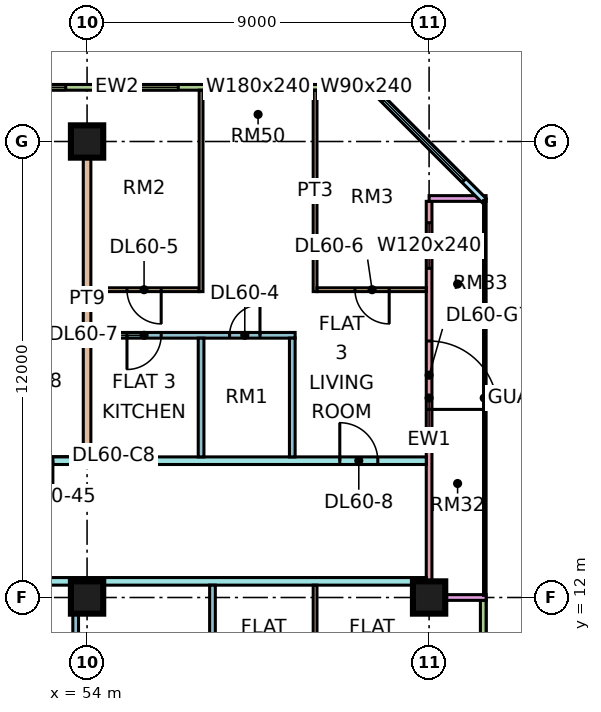
"""IFC4 building model, lengths in metres.
Left out: names, types, materials, properties, quantities, classifications, styles, units other than length and angle.
Written with IfcOpenShell. Run it as: python <this file> out.ifc"""

import sys

from ifc_helpers import new_model, si_unit, direction, frame, frame_2d, origin, origin_2d, place, context, subcontext, project, spatial, rectangle, extrude, element, fill, save


model = new_model("IFC4")
c1 = context("Model", 3, precision=1e-05, world=origin(), true_north=direction((0.0, 1.0)))
c2 = subcontext(c1, "Body", "Model", "MODEL_VIEW")
j1 = project(units=[si_unit("LENGTHUNIT", "METRE"), si_unit("PLANEANGLEUNIT", "RADIAN")], contexts=[c1])
p1 = place(None, origin())
s1 = spatial("IfcSite", under=j1, at=p1, CompositionType="ELEMENT")
p2 = place(p1, origin())
s2 = spatial("IfcBuilding", under=s1, at=p2, CompositionType="ELEMENT")
p3 = place(p2, frame((0.0, 0.0, 252.9)))
s3 = spatial("IfcBuildingStorey", under=s2, at=p3, CompositionType="ELEMENT", Elevation=252.9)
for number, where, z_axis, x_axis in (
    (1, (54.0, 12.0, 0.0), (0.0, 0.0, 1.0), (1.0, 0.0, 0.0)),
    (2, (54.0, 24.0, 0.0), (0.0, 0.0, 1.0), (1.0, 0.0, 0.0)),
    (3, (63.0, 12.0, 0.0), (0.0, 0.0, 1.0), (1.0, 0.0, 0.0)),
):
    element("IfcColumn", number, at=place(p3, frame(where, z_axis=z_axis, x_axis=x_axis)), inside=s3, PredefinedType="COLUMN", context=c2, shape_type="SweptSolid", body=[
        extrude(rectangle(XDim=0.85, YDim=0.85, at=origin_2d()), origin(), (0.0, 0.0, 1.0), 3.75),
    ])
p4 = place(p3, frame((61.5, 25.425, 0.0), z_axis=(0.0, 0.0, 1.0), x_axis=(-1.0, 0.0, 0.0)))
e4 = element("IfcWall", 4, at=p4, inside=s3, PredefinedType="SOLIDWALL", context=c2, shape_type="SweptSolid", body=[
    extrude(rectangle(XDim=13.425, YDim=0.15, at=frame_2d((6.712, 0.0))), origin(), (0.0, 0.0, 1.0), 3.3),
])
p5 = place(p4, frame((0.3, 0.0, 0.45)))
e5 = element("IfcOpeningElement", 5, at=p5, cuts=e4, PredefinedType="OPENING", context=c2, shape_type="SweptSolid", body=[
    extrude(rectangle(XDim=0.9, YDim=2.4, at=frame_2d((0.45, 1.2))), frame((0.0, 0.085, 0.0), z_axis=(0.0, -1.0, 0.0), x_axis=(1.0, 0.0, 0.0)), (0.0, 0.0, 1.0), 0.17),
])
p6 = place(p4, frame((2.1, 0.0, 0.45)))
e6 = element("IfcOpeningElement", 6, at=p6, cuts=e4, PredefinedType="OPENING", context=c2, shape_type="SweptSolid", body=[
    extrude(rectangle(XDim=1.8, YDim=2.4, at=frame_2d((0.9, 1.2))), frame((0.0, 0.085, 0.0), z_axis=(0.0, -1.0, 0.0), x_axis=(1.0, 0.0, 0.0)), (0.0, 0.0, 1.0), 0.17),
])
p7 = place(p4, frame((5.1, 0.0, 0.45)))
e7 = element("IfcOpeningElement", 7, at=p7, cuts=e4, PredefinedType="OPENING", context=c2, shape_type="SweptSolid", body=[
    extrude(rectangle(XDim=1.8, YDim=2.4, at=frame_2d((0.9, 1.2))), frame((0.0, 0.085, 0.0), z_axis=(0.0, -1.0, 0.0), x_axis=(1.0, 0.0, 0.0)), (0.0, 0.0, 1.0), 0.17),
])
p8 = place(p4, frame((8.062, 0.0, 0.45)))
e8 = element("IfcOpeningElement", 8, at=p8, cuts=e4, PredefinedType="OPENING", context=c2, shape_type="SweptSolid", body=[
    extrude(rectangle(XDim=4.8, YDim=2.4, at=frame_2d((2.4, 1.2))), frame((0.0, 0.085, 0.0), z_axis=(0.0, -1.0, 0.0), x_axis=(1.0, 0.0, 0.0)), (0.0, 0.0, 1.0), 0.17),
])
p9 = place(p3, frame((64.425, 1.5, 0.0), z_axis=(0.0, 0.0, 1.0), x_axis=(0.0, 1.0, 0.0)))
e9 = element("IfcWall", 9, at=p9, inside=s3, PredefinedType="SOLIDWALL", context=c2, shape_type="SweptSolid", body=[
    extrude(rectangle(XDim=10.425, YDim=0.15, at=frame_2d((5.212, 0.0))), origin(), (0.0, 0.0, 1.0), 3.3),
])
p10 = place(p9, frame((0.663, 0.0, 0.45)))
e10 = element("IfcOpeningElement", 10, at=p10, cuts=e9, PredefinedType="OPENING", context=c2, shape_type="SweptSolid", body=[
    extrude(rectangle(XDim=4.8, YDim=2.4, at=frame_2d((2.4, 1.2))), frame((0.0, 0.085, 0.0), z_axis=(0.0, -1.0, 0.0), x_axis=(1.0, 0.0, 0.0)), (0.0, 0.0, 1.0), 0.17),
])
p11 = place(p3, frame((63.0, 12.075, 0.0), z_axis=(0.0, 0.0, 1.0), x_axis=(0.0, 1.0, 0.0)))
e11 = element("IfcWall", 11, at=p11, inside=s3, PredefinedType="SOLIDWALL", context=c2, shape_type="SweptSolid", body=[
    extrude(rectangle(XDim=10.35, YDim=0.15, at=frame_2d((5.175, 0.0))), origin(), (0.0, 0.0, 1.0), 3.3),
])
p12 = place(p11, frame((4.875, 0.0, 0.0)))
e12 = element("IfcOpeningElement", 12, at=p12, cuts=e11, PredefinedType="OPENING", context=c2, shape_type="SweptSolid", body=[
    extrude(rectangle(XDim=1.8, YDim=2.4, at=frame_2d((0.9, 1.2))), frame((0.0, 0.085, 0.0), z_axis=(0.0, -1.0, 0.0), x_axis=(1.0, 0.0, 0.0)), (0.0, 0.0, 1.0), 0.17),
])
p13 = place(p11, frame((8.587, 0.0, 0.45)))
e13 = element("IfcOpeningElement", 13, at=p13, cuts=e11, PredefinedType="OPENING", context=c2, shape_type="SweptSolid", body=[
    extrude(rectangle(XDim=1.2, YDim=2.4, at=frame_2d((0.6, 1.2))), frame((0.0, 0.085, 0.0), z_axis=(0.0, -1.0, 0.0), x_axis=(1.0, 0.0, 0.0)), (0.0, 0.0, 1.0), 0.17),
])
for number, where, z_axis, x_axis in (
    (14, (64.5, 12.0, 0.0), (0.0, 0.0, 1.0), (-1.0, 0.0, 0.0)),
    (15, (64.5, 22.5, 0.0), (0.0, 0.0, 1.0), (-1.0, 0.0, 0.0)),
):
    element("IfcWall", number, at=place(p3, frame(where, z_axis=z_axis, x_axis=x_axis)), inside=s3, PredefinedType="SOLIDWALL", context=c2, shape_type="SweptSolid", body=[
        extrude(rectangle(XDim=1.5, YDim=0.15, at=frame_2d((0.75, 0.0))), origin(), (0.0, 0.0, 1.0), 3.3),
    ])
p14 = place(p3, frame((64.447, 22.447, 0.0), z_axis=(0.0, 0.0, 1.0), x_axis=(-0.707106781187, 0.707106781187, 0.0)))
e16 = element("IfcWall", 16, at=p14, inside=s3, PredefinedType="SOLIDWALL", context=c2, shape_type="SweptSolid", body=[
    extrude(rectangle(XDim=4.243, YDim=0.15, at=frame_2d((2.121, 0.0))), origin(), (0.0, 0.0, 1.0), 3.3),
])
p15 = place(p14, frame((0.744, 0.0, 0.45)))
e17 = element("IfcOpeningElement", 17, at=p15, cuts=e16, PredefinedType="OPENING", context=c2, shape_type="SweptSolid", body=[
    extrude(rectangle(XDim=3.0, YDim=2.4, at=frame_2d((1.5, 1.2))), frame((0.0, 0.085, 0.0), z_axis=(0.0, -1.0, 0.0), x_axis=(1.0, 0.0, 0.0)), (0.0, 0.0, 1.0), 0.17),
])
p16 = place(p3, frame((40.65, 12.425, 0.0), z_axis=(0.0, 0.0, 1.0), x_axis=(1.0, 0.0, 0.0)))
e18 = element("IfcWall", 18, at=p16, inside=s3, PredefinedType="PARTITIONING", context=c2, shape_type="SweptSolid", body=[
    extrude(rectangle(XDim=22.276, YDim=0.2, at=frame_2d((11.138, 0.0))), origin(), (0.0, 0.0, 1.0), 3.3),
])
p17 = place(p16, frame((8.7, 0.0, 0.0)))
e19 = element("IfcOpeningElement", 19, at=p17, cuts=e18, PredefinedType="OPENING", context=c2, shape_type="SweptSolid", body=[
    extrude(rectangle(XDim=1.0, YDim=2.1, at=frame_2d((0.5, 1.05))), frame((0.0, 0.11, 0.0), z_axis=(0.0, -1.0, 0.0), x_axis=(1.0, 0.0, 0.0)), (0.0, 0.0, 1.0), 0.22),
])
p18 = place(p16, frame((1.05, 0.0, 0.0)))
e20 = element("IfcOpeningElement", 20, at=p18, cuts=e18, PredefinedType="OPENING", context=c2, shape_type="SweptSolid", body=[
    extrude(rectangle(XDim=1.0, YDim=2.1, at=frame_2d((0.5, 1.05))), frame((0.0, 0.11, 0.0), z_axis=(0.0, -1.0, 0.0), x_axis=(1.0, 0.0, 0.0)), (0.0, 0.0, 1.0), 0.22),
])
p19 = place(p3, frame((51.225, 15.6, 0.0), z_axis=(0.0, 0.0, 1.0), x_axis=(1.0, 0.0, 0.0)))
e21 = element("IfcWall", 21, at=p19, inside=s3, PredefinedType="PARTITIONING", context=c2, shape_type="SweptSolid", body=[
    extrude(rectangle(XDim=11.701, YDim=0.2, at=frame_2d((5.851, 0.0))), origin(), (0.0, 0.0, 1.0), 3.3),
])
p20 = place(p19, frame((9.425, 0.0, 0.0)))
e22 = element("IfcOpeningElement", 22, at=p20, cuts=e21, PredefinedType="OPENING", context=c2, shape_type="SweptSolid", body=[
    extrude(rectangle(XDim=1.0, YDim=2.1, at=frame_2d((0.5, 1.05))), frame((0.0, 0.11, 0.0), z_axis=(0.0, -1.0, 0.0), x_axis=(1.0, 0.0, 0.0)), (0.0, 0.0, 1.0), 0.22),
])
p21 = place(p19, frame((0.875, 0.0, 0.0)))
e23 = element("IfcOpeningElement", 23, at=p21, cuts=e21, PredefinedType="OPENING", context=c2, shape_type="SweptSolid", body=[
    extrude(rectangle(XDim=1.0, YDim=2.1, at=frame_2d((0.5, 1.05))), frame((0.0, 0.11, 0.0), z_axis=(0.0, -1.0, 0.0), x_axis=(1.0, 0.0, 0.0)), (0.0, 0.0, 1.0), 0.22),
])
p22 = place(p3, frame((53.7, 7.7, 0.0), z_axis=(0.0, 0.0, 1.0), x_axis=(0.0, 1.0, 0.0)))
e24 = element("IfcWall", 24, at=p22, inside=s3, PredefinedType="PARTITIONING", context=c2, shape_type="SweptSolid", body=[
    extrude(rectangle(XDim=4.625, YDim=0.15, at=frame_2d((2.312, 0.0))), origin(), (0.0, 0.0, 1.0), 3.3),
])
p23 = place(p3, frame((54.0, 15.7, 0.0), z_axis=(0.0, 0.0, 1.0), x_axis=(0.0, 1.0, 0.0)))
e25 = element("IfcWall", 25, at=p23, inside=s3, PredefinedType="PARTITIONING", context=c2, shape_type="SweptSolid", body=[
    extrude(rectangle(XDim=8.3, YDim=0.2, at=frame_2d((4.15, 0.0))), origin(), (0.0, 0.0, 1.0), 3.3),
])
p24 = place(p3, frame((54.1, 18.9, 0.0), z_axis=(0.0, 0.0, 1.0), x_axis=(1.0, 0.0, 0.0)))
e26 = element("IfcWall", 26, at=p24, inside=s3, PredefinedType="PARTITIONING", context=c2, shape_type="SweptSolid", body=[
    extrude(rectangle(XDim=5.375, YDim=0.15, at=frame_2d((2.688, 0.0))), origin(), (0.0, 0.0, 1.0), 3.3),
])
p25 = place(p24, frame((3.65, 0.0, 0.0)))
e27 = element("IfcOpeningElement", 27, at=p25, cuts=e26, PredefinedType="OPENING", context=c2, shape_type="SweptSolid", body=[
    extrude(rectangle(XDim=0.8, YDim=2.1, at=frame_2d((0.4, 1.05))), frame((0.0, 0.085, 0.0), z_axis=(0.0, -1.0, 0.0), x_axis=(1.0, 0.0, 0.0)), (0.0, 0.0, 1.0), 0.17),
])
p26 = place(p24, frame((0.95, 0.0, 0.0)))
e28 = element("IfcOpeningElement", 28, at=p26, cuts=e26, PredefinedType="OPENING", context=c2, shape_type="SweptSolid", body=[
    extrude(rectangle(XDim=0.9, YDim=2.1, at=frame_2d((0.45, 1.05))), frame((0.0, 0.085, 0.0), z_axis=(0.0, -1.0, 0.0), x_axis=(1.0, 0.0, 0.0)), (0.0, 0.0, 1.0), 0.17),
])
p27 = place(p3, frame((54.1, 20.1, 0.0), z_axis=(0.0, 0.0, 1.0), x_axis=(1.0, 0.0, 0.0)))
e29 = element("IfcWall", 29, at=p27, inside=s3, PredefinedType="PARTITIONING", context=c2, shape_type="SweptSolid", body=[
    extrude(rectangle(XDim=2.85, YDim=0.1, at=frame_2d((1.425, 0.0))), origin(), (0.0, 0.0, 1.0), 3.3),
])
p28 = place(p27, frame((0.95, 0.0, 0.0)))
e30 = element("IfcOpeningElement", 30, at=p28, cuts=e29, PredefinedType="OPENING", context=c2, shape_type="SweptSolid", body=[
    extrude(rectangle(XDim=0.9, YDim=2.1, at=frame_2d((0.45, 1.05))), frame((0.0, 0.06, 0.0), z_axis=(0.0, -1.0, 0.0), x_axis=(1.0, 0.0, 0.0)), (0.0, 0.0, 1.0), 0.12),
])
p29 = place(p3, frame((57.0, 15.7, 0.0), z_axis=(0.0, 0.0, 1.0), x_axis=(0.0, 1.0, 0.0)))
e31 = element("IfcWall", 31, at=p29, inside=s3, PredefinedType="PARTITIONING", context=c2, shape_type="SweptSolid", body=[
    extrude(rectangle(XDim=3.125, YDim=0.15, at=frame_2d((1.562, 0.0))), origin(), (0.0, 0.0, 1.0), 3.3),
])
p30 = place(p3, frame((57.0, 20.05, 0.0), z_axis=(0.0, 0.0, 1.0), x_axis=(0.0, 1.0, 0.0)))
e32 = element("IfcWall", 32, at=p30, inside=s3, PredefinedType="PARTITIONING", context=c2, shape_type="SweptSolid", body=[
    extrude(rectangle(XDim=5.3, YDim=0.1, at=frame_2d((2.65, 0.0))), origin(), (0.0, 0.0, 1.0), 3.3),
])
p31 = place(p3, frame((57.3, 7.7, 0.0), z_axis=(0.0, 0.0, 1.0), x_axis=(0.0, 1.0, 0.0)))
e33 = element("IfcWall", 33, at=p31, inside=s3, PredefinedType="PARTITIONING", context=c2, shape_type="SweptSolid", body=[
    extrude(rectangle(XDim=4.625, YDim=0.15, at=frame_2d((2.312, 0.0))), origin(), (0.0, 0.0, 1.0), 3.3),
])
p32 = place(p3, frame((59.4, 15.7, 0.0), z_axis=(0.0, 0.0, 1.0), x_axis=(0.0, 1.0, 0.0)))
e34 = element("IfcWall", 34, at=p32, inside=s3, PredefinedType="PARTITIONING", context=c2, shape_type="SweptSolid", body=[
    extrude(rectangle(XDim=3.125, YDim=0.15, at=frame_2d((1.562, 0.0))), origin(), (0.0, 0.0, 1.0), 3.3),
])
p33 = place(p3, frame((60.0, 7.7, 0.0), z_axis=(0.0, 0.0, 1.0), x_axis=(0.0, 1.0, 0.0)))
e35 = element("IfcWall", 35, at=p33, inside=s3, PredefinedType="PARTITIONING", context=c2, shape_type="SweptSolid", body=[
    extrude(rectangle(XDim=4.625, YDim=0.1, at=frame_2d((2.312, 0.0))), origin(), (0.0, 0.0, 1.0), 3.3),
])
p34 = place(p3, frame((60.0, 20.05, 0.0), z_axis=(0.0, 0.0, 1.0), x_axis=(0.0, 1.0, 0.0)))
e36 = element("IfcWall", 36, at=p34, inside=s3, PredefinedType="PARTITIONING", context=c2, shape_type="SweptSolid", body=[
    extrude(rectangle(XDim=5.3, YDim=0.1, at=frame_2d((2.65, 0.0))), origin(), (0.0, 0.0, 1.0), 3.3),
])
p35 = place(p3, frame((60.05, 20.1, 0.0), z_axis=(0.0, 0.0, 1.0), x_axis=(1.0, 0.0, 0.0)))
e37 = element("IfcWall", 37, at=p35, inside=s3, PredefinedType="PARTITIONING", context=c2, shape_type="SweptSolid", body=[
    extrude(rectangle(XDim=2.876, YDim=0.1, at=frame_2d((1.438, 0.0))), origin(), (0.0, 0.0, 1.0), 3.3),
])
p36 = place(p35, frame((1.0, 0.0, 0.0)))
e38 = element("IfcOpeningElement", 38, at=p36, cuts=e37, PredefinedType="OPENING", context=c2, shape_type="SweptSolid", body=[
    extrude(rectangle(XDim=0.9, YDim=2.1, at=frame_2d((0.45, 1.05))), frame((0.0, 0.06, 0.0), z_axis=(0.0, -1.0, 0.0), x_axis=(1.0, 0.0, 0.0)), (0.0, 0.0, 1.0), 0.12),
])
p37 = place(p5, origin())
e39 = element("IfcWindow", 39, at=p37, inside=s3, PartitioningType="SINGLE_PANEL", PredefinedType="WINDOW", context=c2, shape_type="SweptSolid", body=[
    extrude(rectangle(XDim=0.9, YDim=2.4, at=frame_2d((0.45, 1.2))), frame((0.0, 0.03, 0.0), z_axis=(0.0, -1.0, 0.0), x_axis=(1.0, 0.0, 0.0)), (0.0, 0.0, 1.0), 0.06),
])
fill(e5, e39)
p38 = place(p6, origin())
e40 = element("IfcWindow", 40, at=p38, inside=s3, PartitioningType="SINGLE_PANEL", PredefinedType="WINDOW", context=c2, shape_type="SweptSolid", body=[
    extrude(rectangle(XDim=1.8, YDim=2.4, at=frame_2d((0.9, 1.2))), frame((0.0, 0.03, 0.0), z_axis=(0.0, -1.0, 0.0), x_axis=(1.0, 0.0, 0.0)), (0.0, 0.0, 1.0), 0.06),
])
fill(e6, e40)
p39 = place(p7, origin())
e41 = element("IfcWindow", 41, at=p39, inside=s3, PartitioningType="SINGLE_PANEL", PredefinedType="WINDOW", context=c2, shape_type="SweptSolid", body=[
    extrude(rectangle(XDim=1.8, YDim=2.4, at=frame_2d((0.9, 1.2))), frame((0.0, 0.03, 0.0), z_axis=(0.0, -1.0, 0.0), x_axis=(1.0, 0.0, 0.0)), (0.0, 0.0, 1.0), 0.06),
])
fill(e7, e41)
p40 = place(p8, origin())
e42 = element("IfcWindow", 42, at=p40, inside=s3, PartitioningType="SINGLE_PANEL", PredefinedType="WINDOW", context=c2, shape_type="SweptSolid", body=[
    extrude(rectangle(XDim=4.8, YDim=2.4, at=frame_2d((2.4, 1.2))), frame((0.0, 0.03, 0.0), z_axis=(0.0, -1.0, 0.0), x_axis=(1.0, 0.0, 0.0)), (0.0, 0.0, 1.0), 0.06),
])
fill(e8, e42)
p41 = place(p12, frame((1.8, 0.0, 0.0), z_axis=(0.0, 0.0, 1.0), x_axis=(-1.0, 0.0, 0.0)))
e43 = element("IfcDoor", 43, at=p41, inside=s3, OperationType="DOUBLE_DOOR_SINGLE_SWING", PredefinedType="DOOR", context=c2, shape_type="SweptSolid", body=[
    extrude(rectangle(XDim=1.8, YDim=2.4, at=frame_2d((0.9, 1.2))), frame((0.0, 0.025, 0.0), z_axis=(0.0, -1.0, 0.0), x_axis=(1.0, 0.0, 0.0)), (0.0, 0.0, 1.0), 0.05),
])
fill(e12, e43)
p42 = place(p13, origin())
e44 = element("IfcWindow", 44, at=p42, inside=s3, PartitioningType="SINGLE_PANEL", PredefinedType="WINDOW", context=c2, shape_type="SweptSolid", body=[
    extrude(rectangle(XDim=1.2, YDim=2.4, at=frame_2d((0.6, 1.2))), frame((0.0, 0.03, 0.0), z_axis=(0.0, -1.0, 0.0), x_axis=(1.0, 0.0, 0.0)), (0.0, 0.0, 1.0), 0.06),
])
fill(e13, e44)
p43 = place(p15, origin())
e45 = element("IfcWindow", 45, at=p43, inside=s3, PartitioningType="SINGLE_PANEL", PredefinedType="WINDOW", context=c2, shape_type="SweptSolid", body=[
    extrude(rectangle(XDim=3.0, YDim=2.4, at=frame_2d((1.5, 1.2))), frame((0.0, 0.03, 0.0), z_axis=(0.0, -1.0, 0.0), x_axis=(1.0, 0.0, 0.0)), (0.0, 0.0, 1.0), 0.06),
])
fill(e17, e45)
p44 = place(p25, frame((0.8, 0.0, 0.0), z_axis=(0.0, 0.0, 1.0), x_axis=(-1.0, 0.0, 0.0)))
e46 = element("IfcDoor", 46, at=p44, inside=s3, OperationType="SINGLE_SWING_RIGHT", PredefinedType="DOOR", context=c2, shape_type="SweptSolid", body=[
    extrude(rectangle(XDim=0.8, YDim=2.1, at=frame_2d((0.4, 1.05))), frame((0.0, 0.025, 0.0), z_axis=(0.0, -1.0, 0.0), x_axis=(1.0, 0.0, 0.0)), (0.0, 0.0, 1.0), 0.05),
])
fill(e27, e46)
p45 = place(p28, origin())
e47 = element("IfcDoor", 47, at=p45, inside=s3, OperationType="SINGLE_SWING_RIGHT", PredefinedType="DOOR", context=c2, shape_type="SweptSolid", body=[
    extrude(rectangle(XDim=0.9, YDim=2.1, at=frame_2d((0.45, 1.05))), frame((0.0, 0.025, 0.0), z_axis=(0.0, -1.0, 0.0), x_axis=(1.0, 0.0, 0.0)), (0.0, 0.0, 1.0), 0.05),
])
fill(e30, e47)
p46 = place(p36, origin())
e48 = element("IfcDoor", 48, at=p46, inside=s3, OperationType="SINGLE_SWING_RIGHT", PredefinedType="DOOR", context=c2, shape_type="SweptSolid", body=[
    extrude(rectangle(XDim=0.9, YDim=2.1, at=frame_2d((0.45, 1.05))), frame((0.0, 0.025, 0.0), z_axis=(0.0, -1.0, 0.0), x_axis=(1.0, 0.0, 0.0)), (0.0, 0.0, 1.0), 0.05),
])
fill(e38, e48)
p47 = place(p26, frame((0.9, 0.0, 0.0), z_axis=(0.0, 0.0, 1.0), x_axis=(-1.0, 0.0, 0.0)))
e49 = element("IfcDoor", 49, at=p47, inside=s3, OperationType="SINGLE_SWING_LEFT", PredefinedType="DOOR", context=c2, shape_type="SweptSolid", body=[
    extrude(rectangle(XDim=0.9, YDim=2.1, at=frame_2d((0.45, 1.05))), frame((0.0, 0.025, 0.0), z_axis=(0.0, -1.0, 0.0), x_axis=(1.0, 0.0, 0.0)), (0.0, 0.0, 1.0), 0.05),
])
fill(e28, e49)
p48 = place(p20, origin())
e50 = element("IfcDoor", 50, at=p48, inside=s3, OperationType="SINGLE_SWING_LEFT", PredefinedType="DOOR", context=c2, shape_type="SweptSolid", body=[
    extrude(rectangle(XDim=1.0, YDim=2.1, at=frame_2d((0.5, 1.05))), frame((0.0, 0.025, 0.0), z_axis=(0.0, -1.0, 0.0), x_axis=(1.0, 0.0, 0.0)), (0.0, 0.0, 1.0), 0.05),
])
fill(e22, e50)
p49 = place(p21, origin())
e51 = element("IfcDoor", 51, at=p49, inside=s3, OperationType="SINGLE_SWING_RIGHT", PredefinedType="DOOR", context=c2, shape_type="SweptSolid", body=[
    extrude(rectangle(XDim=1.0, YDim=2.1, at=frame_2d((0.5, 1.05))), frame((0.0, 0.025, 0.0), z_axis=(0.0, -1.0, 0.0), x_axis=(1.0, 0.0, 0.0)), (0.0, 0.0, 1.0), 0.05),
])
fill(e23, e51)
save(model, sys.argv[1])
